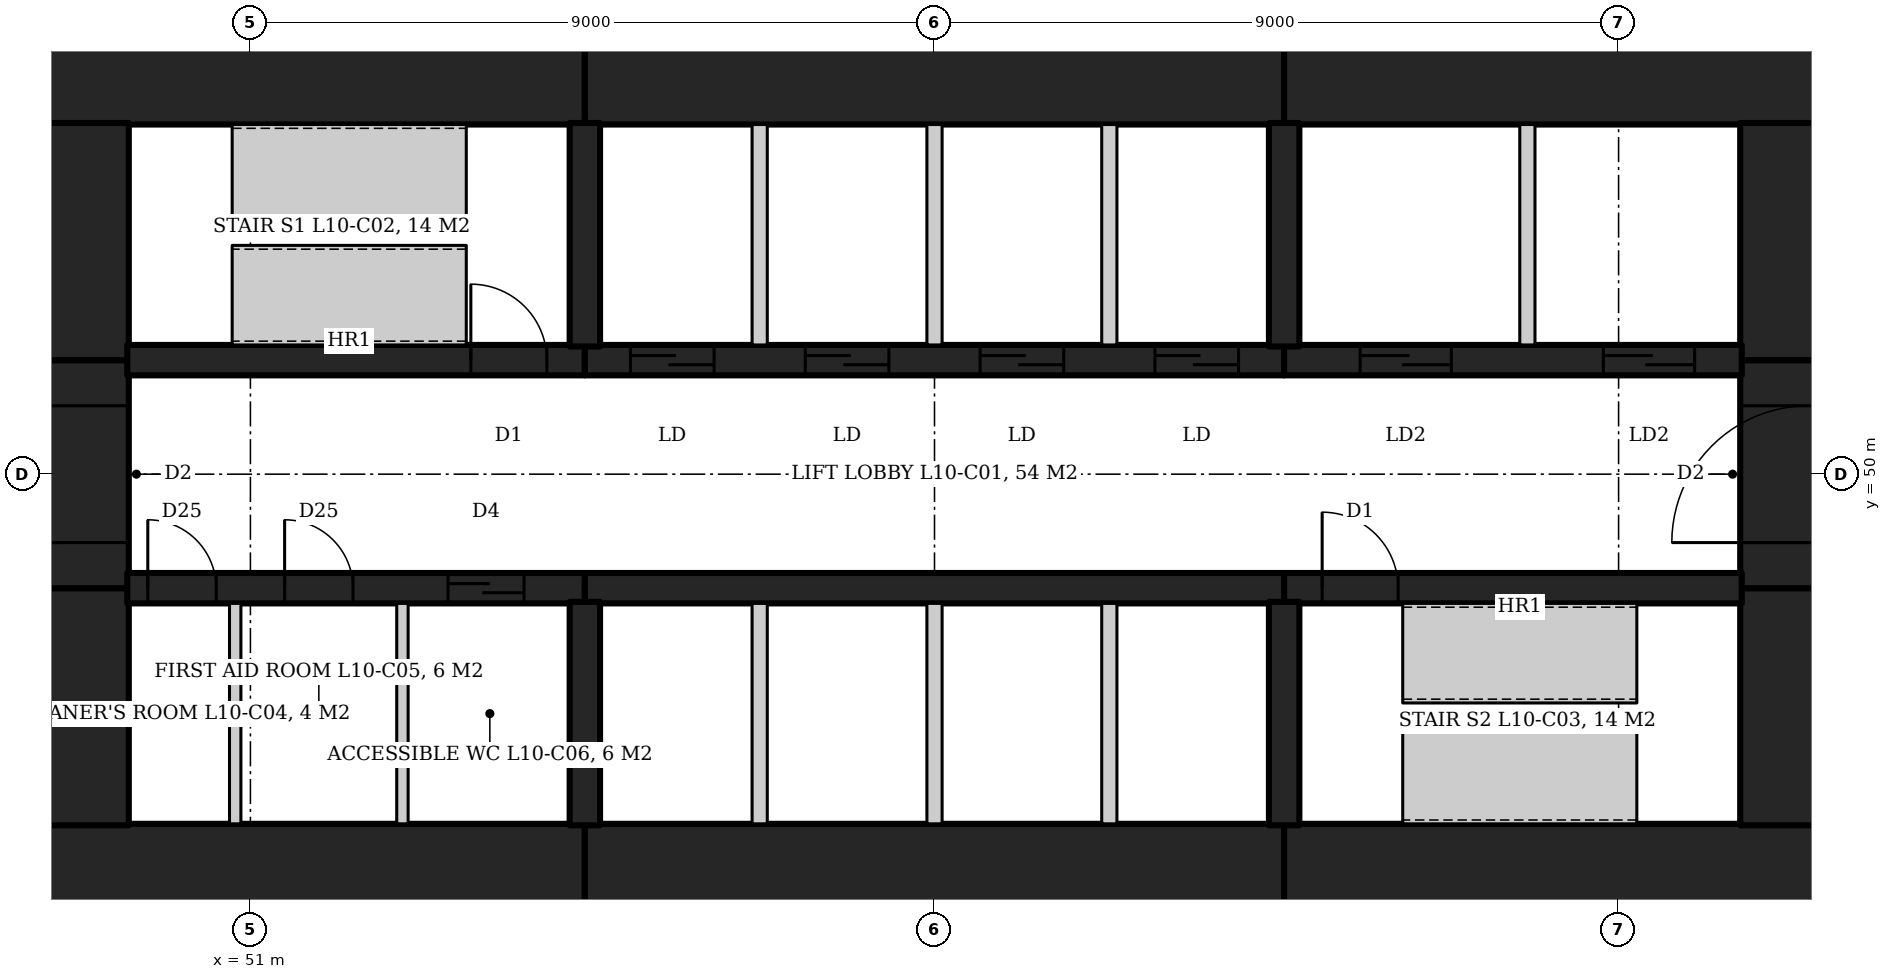
"""IFC4 building model, lengths in metres.
Left out: names, types, materials, properties, quantities, classifications, styles, units other than length and angle.
Written with IfcOpenShell. Run it as: python <this file> out.ifc"""

import sys

from ifc_helpers import new_model, si_unit, direction, frame, frame_2d, origin, place, context, subcontext, project, spatial, rectangle, extrude, element, fill, save


model = new_model("IFC4")
c1 = context("Model", 3, precision=1e-05, world=origin(), true_north=direction((0.0, 1.0)))
c2 = subcontext(c1, "Body", "Model", "MODEL_VIEW")
j1 = project(units=[si_unit("LENGTHUNIT", "METRE"), si_unit("PLANEANGLEUNIT", "RADIAN")], contexts=[c1])
p1 = place(None, origin())
s1 = spatial("IfcSite", under=j1, at=p1, CompositionType="ELEMENT")
p2 = place(p1, origin())
s2 = spatial("IfcBuilding", under=s1, at=p2, CompositionType="ELEMENT")
p3 = place(p2, frame((0.0, 0.0, 42.8)))
s3 = spatial("IfcBuildingStorey", under=s2, at=p3, CompositionType="ELEMENT", Elevation=42.8)
p4 = place(p3, frame((47.6, 55.5, 0.0), z_axis=(0.0, 0.0, 1.0), x_axis=(1.0, 0.0, 0.0)))
e1 = element("IfcWall", 1, at=p4, inside=s3, PredefinedType="SHEAR", context=c2, shape_type="SweptSolid", body=[
    extrude(rectangle(XDim=7.8, YDim=1.8, at=frame_2d((3.9, 0.0))), origin(), (0.0, 0.0, 1.0), 4.2),
])
p5 = place(p3, frame((55.4, 55.5, 0.0), z_axis=(0.0, 0.0, 1.0), x_axis=(1.0, 0.0, 0.0)))
e2 = element("IfcWall", 2, at=p5, inside=s3, PredefinedType="SHEAR", context=c2, shape_type="SweptSolid", body=[
    extrude(rectangle(XDim=9.2, YDim=1.8, at=frame_2d((4.6, 0.0))), origin(), (0.0, 0.0, 1.0), 4.2),
])
for number, where, z_axis, x_axis in (
    (3, (64.6, 55.5, 0.0), (0.0, 0.0, 1.0), (1.0, 0.0, 0.0)),
    (4, (47.6, 44.5, 0.0), (0.0, 0.0, 1.0), (1.0, 0.0, 0.0)),
):
    element("IfcWall", number, at=place(p3, frame(where, z_axis=z_axis, x_axis=x_axis)), inside=s3, PredefinedType="SHEAR", context=c2, shape_type="SweptSolid", body=[
        extrude(rectangle(XDim=7.8, YDim=1.8, at=frame_2d((3.9, 0.0))), origin(), (0.0, 0.0, 1.0), 4.2),
    ])
p6 = place(p3, frame((55.4, 44.5, 0.0), z_axis=(0.0, 0.0, 1.0), x_axis=(1.0, 0.0, 0.0)))
e5 = element("IfcWall", 5, at=p6, inside=s3, PredefinedType="SHEAR", context=c2, shape_type="SweptSolid", body=[
    extrude(rectangle(XDim=9.2, YDim=1.8, at=frame_2d((4.6, 0.0))), origin(), (0.0, 0.0, 1.0), 4.2),
])
p7 = place(p3, frame((64.6, 44.5, 0.0), z_axis=(0.0, 0.0, 1.0), x_axis=(1.0, 0.0, 0.0)))
e6 = element("IfcWall", 6, at=p7, inside=s3, PredefinedType="SHEAR", context=c2, shape_type="SweptSolid", body=[
    extrude(rectangle(XDim=7.8, YDim=1.8, at=frame_2d((3.9, 0.0))), origin(), (0.0, 0.0, 1.0), 4.2),
])
p8 = place(p3, frame((71.5, 45.38, 0.0), z_axis=(0.0, 0.0, 1.0), x_axis=(0.0, 1.0, 0.0)))
e7 = element("IfcWall", 7, at=p8, inside=s3, PredefinedType="SHEAR", context=c2, shape_type="SweptSolid", body=[
    extrude(rectangle(XDim=3.32, YDim=1.8, at=frame_2d((1.66, 0.0))), origin(), (0.0, 0.0, 1.0), 4.2),
])
p9 = place(p3, frame((71.3, 48.7, 0.0), z_axis=(0.0, 0.0, 1.0), x_axis=(0.0, 1.0, 0.0)))
e8 = element("IfcWall", 8, at=p9, inside=s3, PredefinedType="SHEAR", context=c2, shape_type="SweptSolid", body=[
    extrude(rectangle(XDim=2.6, YDim=1.8, at=frame_2d((1.3, 0.0))), origin(), (0.0, 0.0, 1.0), 4.2),
])
p10 = place(p9, frame((0.4, 0.0, 0.0)))
e9 = element("IfcOpeningElement", 9, at=p10, cuts=e8, PredefinedType="OPENING", context=c2, shape_type="SweptSolid", body=[
    extrude(rectangle(XDim=1.8, YDim=2.1, at=frame_2d((0.9, 1.05))), frame((0.0, 0.91, 0.0), z_axis=(0.0, -1.0, 0.0), x_axis=(1.0, 0.0, 0.0)), (0.0, 0.0, 1.0), 1.82),
])
for number, where, z_axis, x_axis in (
    (10, (71.5, 51.3, 0.0), (0.0, 0.0, 1.0), (0.0, 1.0, 0.0)),
    (11, (48.5, 45.38, 0.0), (0.0, 0.0, 1.0), (0.0, 1.0, 0.0)),
):
    element("IfcWall", number, at=place(p3, frame(where, z_axis=z_axis, x_axis=x_axis)), inside=s3, PredefinedType="SHEAR", context=c2, shape_type="SweptSolid", body=[
        extrude(rectangle(XDim=3.32, YDim=1.8, at=frame_2d((1.66, 0.0))), origin(), (0.0, 0.0, 1.0), 4.2),
    ])
p11 = place(p3, frame((48.7, 48.7, 0.0), z_axis=(0.0, 0.0, 1.0), x_axis=(0.0, 1.0, 0.0)))
e12 = element("IfcWall", 12, at=p11, inside=s3, PredefinedType="SHEAR", context=c2, shape_type="SweptSolid", body=[
    extrude(rectangle(XDim=2.6, YDim=1.8, at=frame_2d((1.3, 0.0))), origin(), (0.0, 0.0, 1.0), 4.2),
])
p12 = place(p11, frame((0.4, 0.0, 0.0)))
e13 = element("IfcOpeningElement", 13, at=p12, cuts=e12, PredefinedType="OPENING", context=c2, shape_type="SweptSolid", body=[
    extrude(rectangle(XDim=1.8, YDim=2.1, at=frame_2d((0.9, 1.05))), frame((0.0, 0.91, 0.0), z_axis=(0.0, -1.0, 0.0), x_axis=(1.0, 0.0, 0.0)), (0.0, 0.0, 1.0), 1.82),
])
p13 = place(p3, frame((48.5, 51.3, 0.0), z_axis=(0.0, 0.0, 1.0), x_axis=(0.0, 1.0, 0.0)))
e14 = element("IfcWall", 14, at=p13, inside=s3, PredefinedType="SHEAR", context=c2, shape_type="SweptSolid", body=[
    extrude(rectangle(XDim=3.32, YDim=1.8, at=frame_2d((1.66, 0.0))), origin(), (0.0, 0.0, 1.0), 4.2),
])
p14 = place(p3, frame((49.38, 51.5, 0.0), z_axis=(0.0, 0.0, 1.0), x_axis=(1.0, 0.0, 0.0)))
e15 = element("IfcWall", 15, at=p14, inside=s3, PredefinedType="SHEAR", context=c2, shape_type="SweptSolid", body=[
    extrude(rectangle(XDim=6.02, YDim=0.4, at=frame_2d((3.01, 0.0))), origin(), (0.0, 0.0, 1.0), 4.2),
])
p15 = place(p14, frame((4.52, 0.0, 0.0)))
e16 = element("IfcOpeningElement", 16, at=p15, cuts=e15, PredefinedType="OPENING", context=c2, shape_type="SweptSolid", body=[
    extrude(rectangle(XDim=1.0, YDim=2.1, at=frame_2d((0.5, 1.05))), frame((0.0, 0.21, 0.0), z_axis=(0.0, -1.0, 0.0), x_axis=(1.0, 0.0, 0.0)), (0.0, 0.0, 1.0), 0.42),
])
p16 = place(p3, frame((55.4, 51.5, 0.0), z_axis=(0.0, 0.0, 1.0), x_axis=(1.0, 0.0, 0.0)))
e17 = element("IfcWall", 17, at=p16, inside=s3, PredefinedType="SHEAR", context=c2, shape_type="SweptSolid", body=[
    extrude(rectangle(XDim=9.2, YDim=0.4, at=frame_2d((4.6, 0.0))), origin(), (0.0, 0.0, 1.0), 4.2),
])
p17 = place(p16, frame((0.6, 0.0, 0.0)))
e18 = element("IfcOpeningElement", 18, at=p17, cuts=e17, PredefinedType="OPENING", context=c2, shape_type="SweptSolid", body=[
    extrude(rectangle(XDim=1.1, YDim=2.1, at=frame_2d((0.55, 1.05))), frame((0.0, 0.21, 0.0), z_axis=(0.0, -1.0, 0.0), x_axis=(1.0, 0.0, 0.0)), (0.0, 0.0, 1.0), 0.42),
])
p18 = place(p16, frame((2.9, 0.0, 0.0)))
e19 = element("IfcOpeningElement", 19, at=p18, cuts=e17, PredefinedType="OPENING", context=c2, shape_type="SweptSolid", body=[
    extrude(rectangle(XDim=1.1, YDim=2.1, at=frame_2d((0.55, 1.05))), frame((0.0, 0.21, 0.0), z_axis=(0.0, -1.0, 0.0), x_axis=(1.0, 0.0, 0.0)), (0.0, 0.0, 1.0), 0.42),
])
p19 = place(p16, frame((5.2, 0.0, 0.0)))
e20 = element("IfcOpeningElement", 20, at=p19, cuts=e17, PredefinedType="OPENING", context=c2, shape_type="SweptSolid", body=[
    extrude(rectangle(XDim=1.1, YDim=2.1, at=frame_2d((0.55, 1.05))), frame((0.0, 0.21, 0.0), z_axis=(0.0, -1.0, 0.0), x_axis=(1.0, 0.0, 0.0)), (0.0, 0.0, 1.0), 0.42),
])
p20 = place(p16, frame((7.5, 0.0, 0.0)))
e21 = element("IfcOpeningElement", 21, at=p20, cuts=e17, PredefinedType="OPENING", context=c2, shape_type="SweptSolid", body=[
    extrude(rectangle(XDim=1.1, YDim=2.1, at=frame_2d((0.55, 1.05))), frame((0.0, 0.21, 0.0), z_axis=(0.0, -1.0, 0.0), x_axis=(1.0, 0.0, 0.0)), (0.0, 0.0, 1.0), 0.42),
])
p21 = place(p3, frame((64.6, 51.5, 0.0), z_axis=(0.0, 0.0, 1.0), x_axis=(1.0, 0.0, 0.0)))
e22 = element("IfcWall", 22, at=p21, inside=s3, PredefinedType="SHEAR", context=c2, shape_type="SweptSolid", body=[
    extrude(rectangle(XDim=6.02, YDim=0.4, at=frame_2d((3.01, 0.0))), origin(), (0.0, 0.0, 1.0), 4.2),
])
p22 = place(p21, frame((1.0, 0.0, 0.0)))
e23 = element("IfcOpeningElement", 23, at=p22, cuts=e22, PredefinedType="OPENING", context=c2, shape_type="SweptSolid", body=[
    extrude(rectangle(XDim=1.2, YDim=2.1, at=frame_2d((0.6, 1.05))), frame((0.0, 0.21, 0.0), z_axis=(0.0, -1.0, 0.0), x_axis=(1.0, 0.0, 0.0)), (0.0, 0.0, 1.0), 0.42),
])
p23 = place(p21, frame((4.2, 0.0, 0.0)))
e24 = element("IfcOpeningElement", 24, at=p23, cuts=e22, PredefinedType="OPENING", context=c2, shape_type="SweptSolid", body=[
    extrude(rectangle(XDim=1.2, YDim=2.1, at=frame_2d((0.6, 1.05))), frame((0.0, 0.21, 0.0), z_axis=(0.0, -1.0, 0.0), x_axis=(1.0, 0.0, 0.0)), (0.0, 0.0, 1.0), 0.42),
])
p24 = place(p3, frame((49.38, 48.5, 0.0), z_axis=(0.0, 0.0, 1.0), x_axis=(1.0, 0.0, 0.0)))
e25 = element("IfcWall", 25, at=p24, inside=s3, PredefinedType="SHEAR", context=c2, shape_type="SweptSolid", body=[
    extrude(rectangle(XDim=6.02, YDim=0.4, at=frame_2d((3.01, 0.0))), origin(), (0.0, 0.0, 1.0), 4.2),
])
p25 = place(p24, frame((0.27, 0.0, 0.0)))
e26 = element("IfcOpeningElement", 26, at=p25, cuts=e25, PredefinedType="OPENING", context=c2, shape_type="SweptSolid", body=[
    extrude(rectangle(XDim=0.9, YDim=2.1, at=frame_2d((0.45, 1.05))), frame((0.0, 0.21, 0.0), z_axis=(0.0, -1.0, 0.0), x_axis=(1.0, 0.0, 0.0)), (0.0, 0.0, 1.0), 0.42),
])
p26 = place(p24, frame((2.07, 0.0, 0.0)))
e27 = element("IfcOpeningElement", 27, at=p26, cuts=e25, PredefinedType="OPENING", context=c2, shape_type="SweptSolid", body=[
    extrude(rectangle(XDim=0.9, YDim=2.1, at=frame_2d((0.45, 1.05))), frame((0.0, 0.21, 0.0), z_axis=(0.0, -1.0, 0.0), x_axis=(1.0, 0.0, 0.0)), (0.0, 0.0, 1.0), 0.42),
])
p27 = place(p24, frame((4.22, 0.0, 0.0)))
e28 = element("IfcOpeningElement", 28, at=p27, cuts=e25, PredefinedType="OPENING", context=c2, shape_type="SweptSolid", body=[
    extrude(rectangle(XDim=1.0, YDim=2.1, at=frame_2d((0.5, 1.05))), frame((0.0, 0.21, 0.0), z_axis=(0.0, -1.0, 0.0), x_axis=(1.0, 0.0, 0.0)), (0.0, 0.0, 1.0), 0.42),
])
p28 = place(p3, frame((55.4, 48.5, 0.0), z_axis=(0.0, 0.0, 1.0), x_axis=(1.0, 0.0, 0.0)))
e29 = element("IfcWall", 29, at=p28, inside=s3, PredefinedType="SHEAR", context=c2, shape_type="SweptSolid", body=[
    extrude(rectangle(XDim=9.2, YDim=0.4, at=frame_2d((4.6, 0.0))), origin(), (0.0, 0.0, 1.0), 4.2),
])
p29 = place(p3, frame((64.6, 48.5, 0.0), z_axis=(0.0, 0.0, 1.0), x_axis=(1.0, 0.0, 0.0)))
e30 = element("IfcWall", 30, at=p29, inside=s3, PredefinedType="SHEAR", context=c2, shape_type="SweptSolid", body=[
    extrude(rectangle(XDim=6.02, YDim=0.4, at=frame_2d((3.01, 0.0))), origin(), (0.0, 0.0, 1.0), 4.2),
])
p30 = place(p29, frame((0.5, 0.0, 0.0)))
e31 = element("IfcOpeningElement", 31, at=p30, cuts=e30, PredefinedType="OPENING", context=c2, shape_type="SweptSolid", body=[
    extrude(rectangle(XDim=1.0, YDim=2.1, at=frame_2d((0.5, 1.05))), frame((0.0, 0.21, 0.0), z_axis=(0.0, -1.0, 0.0), x_axis=(1.0, 0.0, 0.0)), (0.0, 0.0, 1.0), 0.42),
])
for number, where, z_axis, x_axis in (
    (32, (55.4, 51.68, 0.0), (0.0, 0.0, 1.0), (0.0, 1.0, 0.0)),
    (33, (64.6, 51.68, 0.0), (0.0, 0.0, 1.0), (0.0, 1.0, 0.0)),
    (34, (55.4, 48.32, 0.0), (0.0, 0.0, 1.0), (0.0, -1.0, 0.0)),
    (35, (64.6, 48.32, 0.0), (0.0, 0.0, 1.0), (0.0, -1.0, 0.0)),
):
    element("IfcWall", number, at=place(p3, frame(where, z_axis=z_axis, x_axis=x_axis)), inside=s3, PredefinedType="SHEAR", context=c2, shape_type="SweptSolid", body=[
        extrude(rectangle(XDim=2.94, YDim=0.4, at=frame_2d((1.47, 0.0))), origin(), (0.0, 0.0, 1.0), 4.2),
    ])
for number, where, z_axis, x_axis in (
    (36, (57.7, 51.7, 0.0), (0.0, 0.0, 1.0), (0.0, 1.0, 0.0)),
    (37, (60.0, 51.7, 0.0), (0.0, 0.0, 1.0), (0.0, 1.0, 0.0)),
    (38, (62.3, 51.7, 0.0), (0.0, 0.0, 1.0), (0.0, 1.0, 0.0)),
    (39, (57.7, 45.4, 0.0), (0.0, 0.0, 1.0), (0.0, 1.0, 0.0)),
    (40, (60.0, 45.4, 0.0), (0.0, 0.0, 1.0), (0.0, 1.0, 0.0)),
    (41, (62.3, 45.4, 0.0), (0.0, 0.0, 1.0), (0.0, 1.0, 0.0)),
    (42, (67.8, 51.7, 0.0), (0.0, 0.0, 1.0), (0.0, 1.0, 0.0)),
):
    element("IfcWall", number, at=place(p3, frame(where, z_axis=z_axis, x_axis=x_axis)), inside=s3, PredefinedType="PARTITIONING", context=c2, shape_type="SweptSolid", body=[
        extrude(rectangle(XDim=2.9, YDim=0.2, at=frame_2d((1.45, 0.0))), origin(), (0.0, 0.0, 1.0), 4.2),
    ])
for number, where, z_axis, x_axis in (
    (43, (50.8, 45.4, 0.0), (0.0, 0.0, 1.0), (0.0, 1.0, 0.0)),
    (44, (53.0, 45.4, 0.0), (0.0, 0.0, 1.0), (0.0, 1.0, 0.0)),
):
    element("IfcWall", number, at=place(p3, frame(where, z_axis=z_axis, x_axis=x_axis)), inside=s3, PredefinedType="PARTITIONING", context=c2, shape_type="SweptSolid", body=[
        extrude(rectangle(XDim=2.9, YDim=0.15, at=frame_2d((1.45, 0.0))), origin(), (0.0, 0.0, 1.0), 4.04),
    ])
p31 = place(p15, origin())
e45 = element("IfcDoor", 45, at=p31, inside=s3, OperationType="SINGLE_SWING_LEFT", PredefinedType="DOOR", context=c2, shape_type="SweptSolid", body=[
    extrude(rectangle(XDim=1.0, YDim=2.1, at=frame_2d((0.5, 1.05))), frame((0.0, 0.025, 0.0), z_axis=(0.0, -1.0, 0.0), x_axis=(1.0, 0.0, 0.0)), (0.0, 0.0, 1.0), 0.05),
])
fill(e16, e45)
p32 = place(p30, origin())
e46 = element("IfcDoor", 46, at=p32, inside=s3, OperationType="SINGLE_SWING_LEFT", PredefinedType="DOOR", context=c2, shape_type="SweptSolid", body=[
    extrude(rectangle(XDim=1.0, YDim=2.1, at=frame_2d((0.5, 1.05))), frame((0.0, 0.025, 0.0), z_axis=(0.0, -1.0, 0.0), x_axis=(1.0, 0.0, 0.0)), (0.0, 0.0, 1.0), 0.05),
])
fill(e31, e46)
p33 = place(p22, origin())
e47 = element("IfcDoor", 47, at=p33, inside=s3, OperationType="SLIDING_TO_LEFT", PredefinedType="DOOR", context=c2, shape_type="SweptSolid", body=[
    extrude(rectangle(XDim=1.2, YDim=2.1, at=frame_2d((0.6, 1.05))), frame((0.0, 0.025, 0.0), z_axis=(0.0, -1.0, 0.0), x_axis=(1.0, 0.0, 0.0)), (0.0, 0.0, 1.0), 0.05),
])
fill(e23, e47)
p34 = place(p23, origin())
e48 = element("IfcDoor", 48, at=p34, inside=s3, OperationType="SLIDING_TO_LEFT", PredefinedType="DOOR", context=c2, shape_type="SweptSolid", body=[
    extrude(rectangle(XDim=1.2, YDim=2.1, at=frame_2d((0.6, 1.05))), frame((0.0, 0.025, 0.0), z_axis=(0.0, -1.0, 0.0), x_axis=(1.0, 0.0, 0.0)), (0.0, 0.0, 1.0), 0.05),
])
fill(e24, e48)
p35 = place(p17, origin())
e49 = element("IfcDoor", 49, at=p35, inside=s3, OperationType="SLIDING_TO_LEFT", PredefinedType="DOOR", context=c2, shape_type="SweptSolid", body=[
    extrude(rectangle(XDim=1.1, YDim=2.1, at=frame_2d((0.55, 1.05))), frame((0.0, 0.025, 0.0), z_axis=(0.0, -1.0, 0.0), x_axis=(1.0, 0.0, 0.0)), (0.0, 0.0, 1.0), 0.05),
])
fill(e18, e49)
p36 = place(p18, origin())
e50 = element("IfcDoor", 50, at=p36, inside=s3, OperationType="SLIDING_TO_LEFT", PredefinedType="DOOR", context=c2, shape_type="SweptSolid", body=[
    extrude(rectangle(XDim=1.1, YDim=2.1, at=frame_2d((0.55, 1.05))), frame((0.0, 0.025, 0.0), z_axis=(0.0, -1.0, 0.0), x_axis=(1.0, 0.0, 0.0)), (0.0, 0.0, 1.0), 0.05),
])
fill(e19, e50)
p37 = place(p19, origin())
e51 = element("IfcDoor", 51, at=p37, inside=s3, OperationType="SLIDING_TO_LEFT", PredefinedType="DOOR", context=c2, shape_type="SweptSolid", body=[
    extrude(rectangle(XDim=1.1, YDim=2.1, at=frame_2d((0.55, 1.05))), frame((0.0, 0.025, 0.0), z_axis=(0.0, -1.0, 0.0), x_axis=(1.0, 0.0, 0.0)), (0.0, 0.0, 1.0), 0.05),
])
fill(e20, e51)
p38 = place(p20, origin())
e52 = element("IfcDoor", 52, at=p38, inside=s3, OperationType="SLIDING_TO_LEFT", PredefinedType="DOOR", context=c2, shape_type="SweptSolid", body=[
    extrude(rectangle(XDim=1.1, YDim=2.1, at=frame_2d((0.55, 1.05))), frame((0.0, 0.025, 0.0), z_axis=(0.0, -1.0, 0.0), x_axis=(1.0, 0.0, 0.0)), (0.0, 0.0, 1.0), 0.05),
])
fill(e21, e52)
p39 = place(p25, origin())
e53 = element("IfcDoor", 53, at=p39, inside=s3, OperationType="SINGLE_SWING_RIGHT", PredefinedType="DOOR", context=c2, shape_type="SweptSolid", body=[
    extrude(rectangle(XDim=0.9, YDim=2.1, at=frame_2d((0.45, 1.05))), frame((0.0, 0.025, 0.0), z_axis=(0.0, -1.0, 0.0), x_axis=(1.0, 0.0, 0.0)), (0.0, 0.0, 1.0), 0.05),
])
fill(e26, e53)
p40 = place(p26, origin())
e54 = element("IfcDoor", 54, at=p40, inside=s3, OperationType="SINGLE_SWING_RIGHT", PredefinedType="DOOR", context=c2, shape_type="SweptSolid", body=[
    extrude(rectangle(XDim=0.9, YDim=2.1, at=frame_2d((0.45, 1.05))), frame((0.0, 0.025, 0.0), z_axis=(0.0, -1.0, 0.0), x_axis=(1.0, 0.0, 0.0)), (0.0, 0.0, 1.0), 0.05),
])
fill(e27, e54)
p41 = place(p27, origin())
e55 = element("IfcDoor", 55, at=p41, inside=s3, OperationType="SLIDING_TO_LEFT", PredefinedType="DOOR", context=c2, shape_type="SweptSolid", body=[
    extrude(rectangle(XDim=1.0, YDim=2.1, at=frame_2d((0.5, 1.05))), frame((0.0, 0.025, 0.0), z_axis=(0.0, -1.0, 0.0), x_axis=(1.0, 0.0, 0.0)), (0.0, 0.0, 1.0), 0.05),
])
fill(e28, e55)
p42 = place(p10, origin())
e56 = element("IfcDoor", 56, at=p42, inside=s3, OperationType="DOUBLE_DOOR_DOUBLE_SWING", PredefinedType="DOOR", context=c2, shape_type="SweptSolid", body=[
    extrude(rectangle(XDim=1.8, YDim=2.1, at=frame_2d((0.9, 1.05))), frame((0.0, 0.025, 0.0), z_axis=(0.0, -1.0, 0.0), x_axis=(1.0, 0.0, 0.0)), (0.0, 0.0, 1.0), 0.05),
])
fill(e9, e56)
p43 = place(p12, origin())
e57 = element("IfcDoor", 57, at=p43, inside=s3, OperationType="DOUBLE_DOOR_DOUBLE_SWING", PredefinedType="DOOR", context=c2, shape_type="SweptSolid", body=[
    extrude(rectangle(XDim=1.8, YDim=2.1, at=frame_2d((0.9, 1.05))), frame((0.0, 0.025, 0.0), z_axis=(0.0, -1.0, 0.0), x_axis=(1.0, 0.0, 0.0)), (0.0, 0.0, 1.0), 0.05),
])
fill(e13, e57)
save(model, sys.argv[1])
